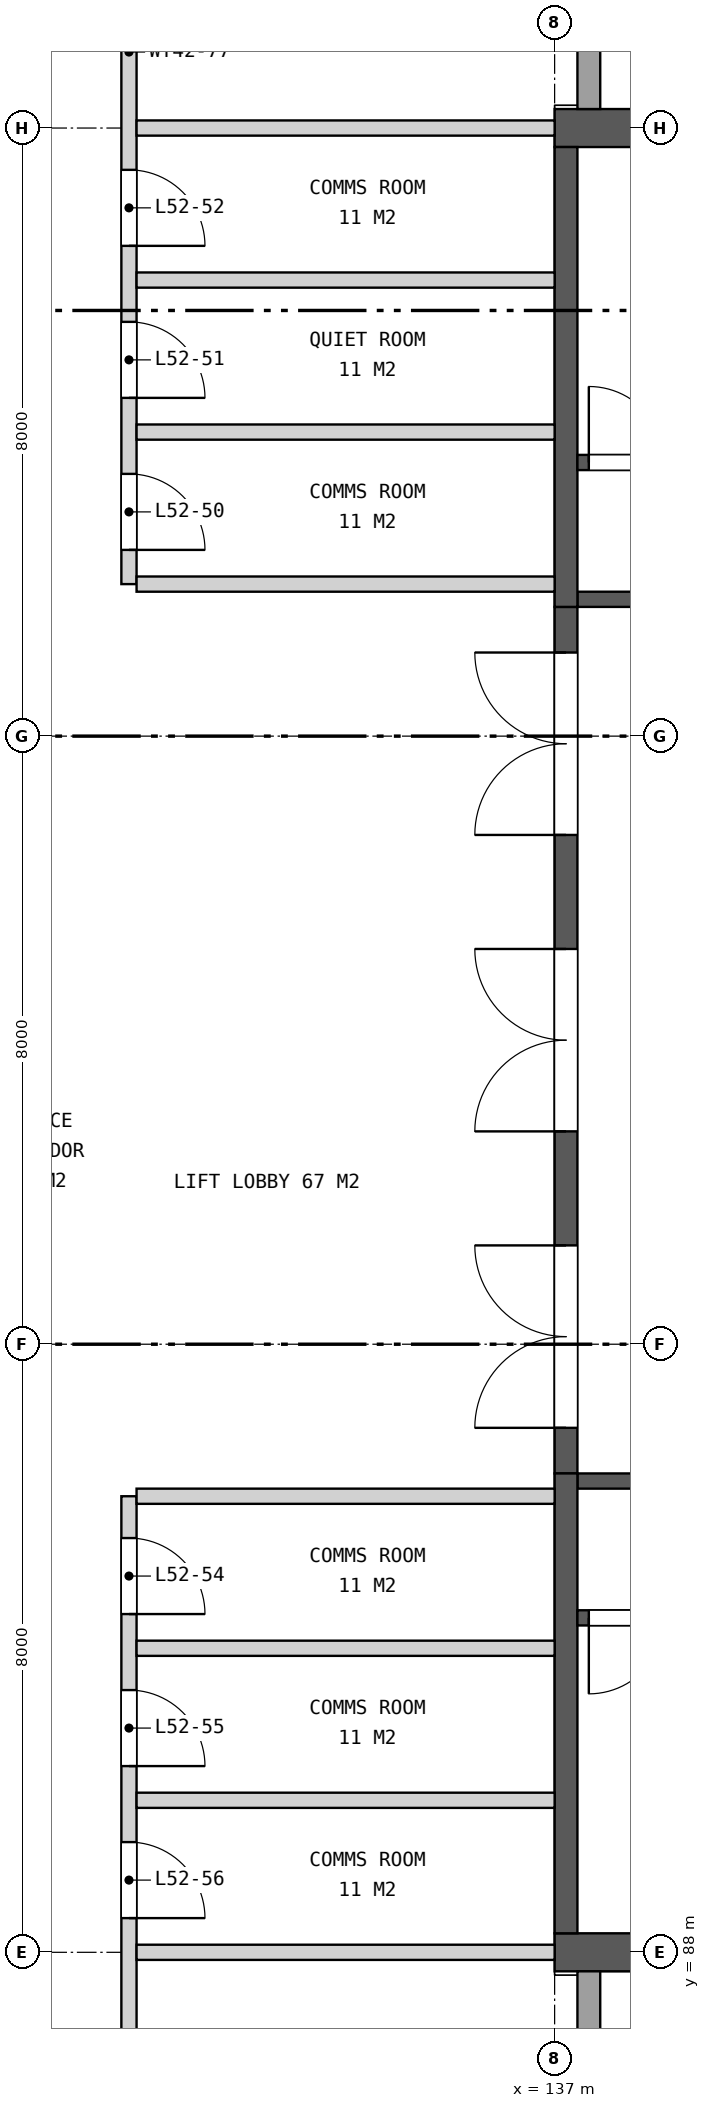
"""IFC4 building model, lengths in metres.
Left out: names, types, materials, properties, quantities, classifications, styles, units other than length and angle.
Written with IfcOpenShell. Run it as: python <this file> out.ifc"""

import sys

from ifc_helpers import new_model, si_unit, direction, frame, frame_2d, origin, place, context, subcontext, project, spatial, rectangle, extrude, element, fill, save


model = new_model("IFC4")
c1 = context("Model", 3, precision=1e-05, world=origin(), true_north=direction((0.0, 1.0)))
c2 = subcontext(c1, "Body", "Model", "MODEL_VIEW")
j1 = project(units=[si_unit("LENGTHUNIT", "METRE"), si_unit("PLANEANGLEUNIT", "RADIAN")], contexts=[c1])
p1 = place(None, origin())
s1 = spatial("IfcSite", under=j1, at=p1, CompositionType="ELEMENT")
p2 = place(p1, origin())
s2 = spatial("IfcBuilding", under=s1, at=p2, CompositionType="ELEMENT")
p3 = place(p2, frame((0.0, 0.0, 245.1)))
s3 = spatial("IfcBuildingStorey", under=s2, at=p3, CompositionType="ELEMENT", Elevation=245.1)
for number, where, z_axis, x_axis in (
    (1, (137.0, 112.0, 0.0), (0.0, 0.0, 1.0), (1.0, 0.0, 0.0)),
    (2, (137.0, 88.0, 0.0), (0.0, 0.0, 1.0), (1.0, 0.0, 0.0)),
):
    element("IfcWall", number, at=place(p3, frame(where, z_axis=z_axis, x_axis=x_axis)), inside=s3, PredefinedType="SHEAR", context=c2, shape_type="SweptSolid", body=[
        extrude(rectangle(XDim=7.1, YDim=0.5, at=frame_2d((3.55, 0.0))), origin(), (0.0, 0.0, 1.0), 4.2),
    ])
p4 = place(p3, frame((137.15, 94.3, 0.0), z_axis=(0.0, 0.0, 1.0), x_axis=(0.0, 1.0, 0.0)))
e3 = element("IfcWall", 3, at=p4, inside=s3, PredefinedType="SHEAR", context=c2, shape_type="SweptSolid", body=[
    extrude(rectangle(XDim=11.4, YDim=0.3, at=frame_2d((5.7, 0.0))), origin(), (0.0, 0.0, 1.0), 4.2),
])
p5 = place(p4, frame((0.6, 0.0, 0.0)))
e4 = element("IfcOpeningElement", 4, at=p5, cuts=e3, PredefinedType="OPENING", context=c2, shape_type="SweptSolid", body=[
    extrude(rectangle(XDim=2.4, YDim=2.4, at=frame_2d((1.2, 1.2))), frame((0.0, 0.16, 0.0), z_axis=(0.0, -1.0, 0.0), x_axis=(1.0, 0.0, 0.0)), (0.0, 0.0, 1.0), 0.32),
])
p6 = place(p4, frame((4.5, 0.0, 0.0)))
e5 = element("IfcOpeningElement", 5, at=p6, cuts=e3, PredefinedType="OPENING", context=c2, shape_type="SweptSolid", body=[
    extrude(rectangle(XDim=2.4, YDim=2.4, at=frame_2d((1.2, 1.2))), frame((0.0, 0.16, 0.0), z_axis=(0.0, -1.0, 0.0), x_axis=(1.0, 0.0, 0.0)), (0.0, 0.0, 1.0), 0.32),
])
p7 = place(p4, frame((8.4, 0.0, 0.0)))
e6 = element("IfcOpeningElement", 6, at=p7, cuts=e3, PredefinedType="OPENING", context=c2, shape_type="SweptSolid", body=[
    extrude(rectangle(XDim=2.4, YDim=2.4, at=frame_2d((1.2, 1.2))), frame((0.0, 0.16, 0.0), z_axis=(0.0, -1.0, 0.0), x_axis=(1.0, 0.0, 0.0)), (0.0, 0.0, 1.0), 0.32),
])
p8 = place(p3, frame((137.3, 105.8, 0.0), z_axis=(0.0, 0.0, 1.0), x_axis=(1.0, 0.0, 0.0)))
e7 = element("IfcWall", 7, at=p8, inside=s3, PredefinedType="SHEAR", context=c2, shape_type="SweptSolid", body=[
    extrude(rectangle(XDim=15.45, YDim=0.2, at=frame_2d((7.725, 0.0))), origin(), (0.0, 0.0, 1.0), 4.2),
])
p9 = place(p8, frame((0.95, 0.0, 0.0)))
e8 = element("IfcOpeningElement", 8, at=p9, cuts=e7, PredefinedType="OPENING", context=c2, shape_type="SweptSolid", body=[
    extrude(rectangle(XDim=1.1, YDim=2.1, at=frame_2d((0.55, 1.05))), frame((0.0, 0.11, 0.0), z_axis=(0.0, -1.0, 0.0), x_axis=(1.0, 0.0, 0.0)), (0.0, 0.0, 1.0), 0.22),
])
p10 = place(p3, frame((137.15, 105.7, 0.0), z_axis=(0.0, 0.0, 1.0), x_axis=(0.0, 1.0, 0.0)))
e9 = element("IfcWall", 9, at=p10, inside=s3, PredefinedType="SHEAR", context=c2, shape_type="SweptSolid", body=[
    extrude(rectangle(XDim=6.05, YDim=0.3, at=frame_2d((3.025, 0.0))), origin(), (0.0, 0.0, 1.0), 4.2),
])
p11 = place(p3, frame((137.3, 107.6, 0.0), z_axis=(0.0, 0.0, 1.0), x_axis=(1.0, 0.0, 0.0)))
e10 = element("IfcWall", 10, at=p11, inside=s3, PredefinedType="SHEAR", context=c2, shape_type="SweptSolid", body=[
    extrude(rectangle(XDim=6.8, YDim=0.2, at=frame_2d((3.4, 0.0))), origin(), (0.0, 0.0, 1.0), 4.2),
])
p12 = place(p11, frame((0.15, 0.0, 0.0)))
e11 = element("IfcOpeningElement", 11, at=p12, cuts=e10, PredefinedType="OPENING", context=c2, shape_type="SweptSolid", body=[
    extrude(rectangle(XDim=1.0, YDim=2.1, at=frame_2d((0.5, 1.05))), frame((0.0, 0.11, 0.0), z_axis=(0.0, -1.0, 0.0), x_axis=(1.0, 0.0, 0.0)), (0.0, 0.0, 1.0), 0.22),
])
p13 = place(p3, frame((137.3, 94.2, 0.0), z_axis=(0.0, 0.0, 1.0), x_axis=(1.0, 0.0, 0.0)))
e12 = element("IfcWall", 12, at=p13, inside=s3, PredefinedType="SHEAR", context=c2, shape_type="SweptSolid", body=[
    extrude(rectangle(XDim=15.45, YDim=0.2, at=frame_2d((7.725, 0.0))), origin(), (0.0, 0.0, 1.0), 4.2),
])
p14 = place(p13, frame((0.95, 0.0, 0.0)))
e13 = element("IfcOpeningElement", 13, at=p14, cuts=e12, PredefinedType="OPENING", context=c2, shape_type="SweptSolid", body=[
    extrude(rectangle(XDim=1.1, YDim=2.1, at=frame_2d((0.55, 1.05))), frame((0.0, 0.11, 0.0), z_axis=(0.0, -1.0, 0.0), x_axis=(1.0, 0.0, 0.0)), (0.0, 0.0, 1.0), 0.22),
])
p15 = place(p3, frame((137.15, 88.25, 0.0), z_axis=(0.0, 0.0, 1.0), x_axis=(0.0, 1.0, 0.0)))
e14 = element("IfcWall", 14, at=p15, inside=s3, PredefinedType="SHEAR", context=c2, shape_type="SweptSolid", body=[
    extrude(rectangle(XDim=6.05, YDim=0.3, at=frame_2d((3.025, 0.0))), origin(), (0.0, 0.0, 1.0), 4.2),
])
p16 = place(p3, frame((137.3, 92.4, 0.0), z_axis=(0.0, 0.0, 1.0), x_axis=(1.0, 0.0, 0.0)))
e15 = element("IfcWall", 15, at=p16, inside=s3, PredefinedType="SHEAR", context=c2, shape_type="SweptSolid", body=[
    extrude(rectangle(XDim=6.8, YDim=0.2, at=frame_2d((3.4, 0.0))), origin(), (0.0, 0.0, 1.0), 4.2),
])
p17 = place(p16, frame((0.15, 0.0, 0.0)))
e16 = element("IfcOpeningElement", 16, at=p17, cuts=e15, PredefinedType="OPENING", context=c2, shape_type="SweptSolid", body=[
    extrude(rectangle(XDim=1.0, YDim=2.1, at=frame_2d((0.5, 1.05))), frame((0.0, 0.11, 0.0), z_axis=(0.0, -1.0, 0.0), x_axis=(1.0, 0.0, 0.0)), (0.0, 0.0, 1.0), 0.22),
])
p18 = place(p3, frame((137.45, 112.25, 0.0), z_axis=(0.0, 0.0, 1.0), x_axis=(0.0, 1.0, 0.0)))
e17 = element("IfcWall", 17, at=p18, inside=s3, PredefinedType="SOLIDWALL", context=c2, shape_type="SweptSolid", body=[
    extrude(rectangle(XDim=7.715, YDim=0.3, at=frame_2d((3.857, 0.0))), origin(), (0.0, 0.0, 1.0), 3.9),
])
p19 = place(p18, frame((2.55, 0.0, 0.0)))
e18 = element("IfcOpeningElement", 18, at=p19, cuts=e17, PredefinedType="OPENING", context=c2, shape_type="SweptSolid", body=[
    extrude(rectangle(XDim=2.4, YDim=2.4, at=frame_2d((1.2, 1.2))), frame((0.0, 0.16, 0.0), z_axis=(0.0, -1.0, 0.0), x_axis=(1.0, 0.0, 0.0)), (0.0, 0.0, 1.0), 0.32),
])
p20 = place(p3, frame((137.45, 80.035, 0.0), z_axis=(0.0, 0.0, 1.0), x_axis=(0.0, 1.0, 0.0)))
e19 = element("IfcWall", 19, at=p20, inside=s3, PredefinedType="SOLIDWALL", context=c2, shape_type="SweptSolid", body=[
    extrude(rectangle(XDim=7.715, YDim=0.3, at=frame_2d((3.857, 0.0))), origin(), (0.0, 0.0, 1.0), 3.9),
])
p21 = place(p20, frame((2.765, 0.0, 0.0)))
e20 = element("IfcOpeningElement", 20, at=p21, cuts=e19, PredefinedType="OPENING", context=c2, shape_type="SweptSolid", body=[
    extrude(rectangle(XDim=2.4, YDim=2.4, at=frame_2d((1.2, 1.2))), frame((0.0, 0.16, 0.0), z_axis=(0.0, -1.0, 0.0), x_axis=(1.0, 0.0, 0.0)), (0.0, 0.0, 1.0), 0.32),
])
p22 = place(p3, frame((131.4, 80.0, 0.0), z_axis=(0.0, 0.0, 1.0), x_axis=(0.0, 1.0, 0.0)))
e21 = element("IfcWall", 21, at=p22, inside=s3, PredefinedType="SOLIDWALL", context=c2, shape_type="SweptSolid", body=[
    extrude(rectangle(XDim=14.0, YDim=0.2, at=frame_2d((7.0, 0.0))), origin(), (0.0, 0.0, 1.0), 3.443),
])
p23 = place(p22, frame((12.45, 0.0, 0.0)))
e22 = element("IfcOpeningElement", 22, at=p23, cuts=e21, PredefinedType="OPENING", context=c2, shape_type="SweptSolid", body=[
    extrude(rectangle(XDim=1.0, YDim=2.1, at=frame_2d((0.5, 1.05))), frame((0.0, 0.11, 0.0), z_axis=(0.0, -1.0, 0.0), x_axis=(1.0, 0.0, 0.0)), (0.0, 0.0, 1.0), 0.22),
])
p24 = place(p22, frame((10.45, 0.0, 0.0)))
e23 = element("IfcOpeningElement", 23, at=p24, cuts=e21, PredefinedType="OPENING", context=c2, shape_type="SweptSolid", body=[
    extrude(rectangle(XDim=1.0, YDim=2.1, at=frame_2d((0.5, 1.05))), frame((0.0, 0.11, 0.0), z_axis=(0.0, -1.0, 0.0), x_axis=(1.0, 0.0, 0.0)), (0.0, 0.0, 1.0), 0.22),
])
p25 = place(p22, frame((8.45, 0.0, 0.0)))
e24 = element("IfcOpeningElement", 24, at=p25, cuts=e21, PredefinedType="OPENING", context=c2, shape_type="SweptSolid", body=[
    extrude(rectangle(XDim=1.0, YDim=2.1, at=frame_2d((0.5, 1.05))), frame((0.0, 0.11, 0.0), z_axis=(0.0, -1.0, 0.0), x_axis=(1.0, 0.0, 0.0)), (0.0, 0.0, 1.0), 0.22),
])
p26 = place(p22, frame((3.45, 0.0, 0.0)))
e25 = element("IfcOpeningElement", 25, at=p26, cuts=e21, PredefinedType="OPENING", context=c2, shape_type="SweptSolid", body=[
    extrude(rectangle(XDim=1.0, YDim=2.1, at=frame_2d((0.5, 1.05))), frame((0.0, 0.11, 0.0), z_axis=(0.0, -1.0, 0.0), x_axis=(1.0, 0.0, 0.0)), (0.0, 0.0, 1.0), 0.22),
])
p27 = place(p3, frame((131.4, 106.0, 0.0), z_axis=(0.0, 0.0, 1.0), x_axis=(0.0, 1.0, 0.0)))
e26 = element("IfcWall", 26, at=p27, inside=s3, PredefinedType="SOLIDWALL", context=c2, shape_type="SweptSolid", body=[
    extrude(rectangle(XDim=14.0, YDim=0.2, at=frame_2d((7.0, 0.0))), origin(), (0.0, 0.0, 1.0), 3.443),
])
p28 = place(p27, frame((0.45, 0.0, 0.0)))
e27 = element("IfcOpeningElement", 27, at=p28, cuts=e26, PredefinedType="OPENING", context=c2, shape_type="SweptSolid", body=[
    extrude(rectangle(XDim=1.0, YDim=2.1, at=frame_2d((0.5, 1.05))), frame((0.0, 0.11, 0.0), z_axis=(0.0, -1.0, 0.0), x_axis=(1.0, 0.0, 0.0)), (0.0, 0.0, 1.0), 0.22),
])
p29 = place(p27, frame((2.45, 0.0, 0.0)))
e28 = element("IfcOpeningElement", 28, at=p29, cuts=e26, PredefinedType="OPENING", context=c2, shape_type="SweptSolid", body=[
    extrude(rectangle(XDim=1.0, YDim=2.1, at=frame_2d((0.5, 1.05))), frame((0.0, 0.11, 0.0), z_axis=(0.0, -1.0, 0.0), x_axis=(1.0, 0.0, 0.0)), (0.0, 0.0, 1.0), 0.22),
])
p30 = place(p27, frame((4.45, 0.0, 0.0)))
e29 = element("IfcOpeningElement", 29, at=p30, cuts=e26, PredefinedType="OPENING", context=c2, shape_type="SweptSolid", body=[
    extrude(rectangle(XDim=1.0, YDim=2.1, at=frame_2d((0.5, 1.05))), frame((0.0, 0.11, 0.0), z_axis=(0.0, -1.0, 0.0), x_axis=(1.0, 0.0, 0.0)), (0.0, 0.0, 1.0), 0.22),
])
p31 = place(p27, frame((9.45, 0.0, 0.0)))
e30 = element("IfcOpeningElement", 30, at=p31, cuts=e26, PredefinedType="OPENING", context=c2, shape_type="SweptSolid", body=[
    extrude(rectangle(XDim=1.0, YDim=2.1, at=frame_2d((0.5, 1.05))), frame((0.0, 0.11, 0.0), z_axis=(0.0, -1.0, 0.0), x_axis=(1.0, 0.0, 0.0)), (0.0, 0.0, 1.0), 0.22),
])
for number, where, z_axis, x_axis in (
    (31, (131.5, 88.0, 0.0), (0.0, 0.0, 1.0), (1.0, 0.0, 0.0)),
    (32, (131.5, 90.0, 0.0), (0.0, 0.0, 1.0), (1.0, 0.0, 0.0)),
    (33, (131.5, 92.0, 0.0), (0.0, 0.0, 1.0), (1.0, 0.0, 0.0)),
    (34, (131.5, 94.0, 0.0), (0.0, 0.0, 1.0), (1.0, 0.0, 0.0)),
    (35, (131.5, 106.0, 0.0), (0.0, 0.0, 1.0), (1.0, 0.0, 0.0)),
    (36, (131.5, 108.0, 0.0), (0.0, 0.0, 1.0), (1.0, 0.0, 0.0)),
    (37, (131.5, 110.0, 0.0), (0.0, 0.0, 1.0), (1.0, 0.0, 0.0)),
    (38, (131.5, 112.0, 0.0), (0.0, 0.0, 1.0), (1.0, 0.0, 0.0)),
):
    element("IfcWall", number, at=place(p3, frame(where, z_axis=z_axis, x_axis=x_axis)), inside=s3, PredefinedType="SOLIDWALL", context=c2, shape_type="SweptSolid", body=[
        extrude(rectangle(XDim=5.5, YDim=0.2, at=frame_2d((2.75, 0.0))), origin(), (0.0, 0.0, 1.0), 3.443),
    ])
p32 = place(p5, origin())
e39 = element("IfcDoor", 39, at=p32, inside=s3, OperationType="DOUBLE_DOOR_SINGLE_SWING", PredefinedType="DOOR", context=c2, shape_type="SweptSolid", body=[
    extrude(rectangle(XDim=2.4, YDim=2.4, at=frame_2d((1.2, 1.2))), frame((0.0, 0.025, 0.0), z_axis=(0.0, -1.0, 0.0), x_axis=(1.0, 0.0, 0.0)), (0.0, 0.0, 1.0), 0.05),
])
fill(e4, e39)
p33 = place(p6, origin())
e40 = element("IfcDoor", 40, at=p33, inside=s3, OperationType="DOUBLE_DOOR_SINGLE_SWING", PredefinedType="DOOR", context=c2, shape_type="SweptSolid", body=[
    extrude(rectangle(XDim=2.4, YDim=2.4, at=frame_2d((1.2, 1.2))), frame((0.0, 0.025, 0.0), z_axis=(0.0, -1.0, 0.0), x_axis=(1.0, 0.0, 0.0)), (0.0, 0.0, 1.0), 0.05),
])
fill(e5, e40)
p34 = place(p7, origin())
e41 = element("IfcDoor", 41, at=p34, inside=s3, OperationType="DOUBLE_DOOR_SINGLE_SWING", PredefinedType="DOOR", context=c2, shape_type="SweptSolid", body=[
    extrude(rectangle(XDim=2.4, YDim=2.4, at=frame_2d((1.2, 1.2))), frame((0.0, 0.025, 0.0), z_axis=(0.0, -1.0, 0.0), x_axis=(1.0, 0.0, 0.0)), (0.0, 0.0, 1.0), 0.05),
])
fill(e6, e41)
p35 = place(p12, origin())
e42 = element("IfcDoor", 42, at=p35, inside=s3, OperationType="SINGLE_SWING_LEFT", PredefinedType="DOOR", context=c2, shape_type="SweptSolid", body=[
    extrude(rectangle(XDim=1.0, YDim=2.1, at=frame_2d((0.5, 1.05))), frame((0.0, 0.025, 0.0), z_axis=(0.0, -1.0, 0.0), x_axis=(1.0, 0.0, 0.0)), (0.0, 0.0, 1.0), 0.05),
])
fill(e11, e42)
p36 = place(p17, frame((1.0, 0.0, 0.0), z_axis=(0.0, 0.0, 1.0), x_axis=(-1.0, 0.0, 0.0)))
e43 = element("IfcDoor", 43, at=p36, inside=s3, OperationType="SINGLE_SWING_RIGHT", PredefinedType="DOOR", context=c2, shape_type="SweptSolid", body=[
    extrude(rectangle(XDim=1.0, YDim=2.1, at=frame_2d((0.5, 1.05))), frame((0.0, 0.025, 0.0), z_axis=(0.0, -1.0, 0.0), x_axis=(1.0, 0.0, 0.0)), (0.0, 0.0, 1.0), 0.05),
])
fill(e16, e43)
p37 = place(p28, frame((1.0, 0.0, 0.0), z_axis=(0.0, 0.0, 1.0), x_axis=(-1.0, 0.0, 0.0)))
e44 = element("IfcDoor", 44, at=p37, inside=s3, OperationType="SINGLE_SWING_RIGHT", PredefinedType="DOOR", context=c2, shape_type="SweptSolid", body=[
    extrude(rectangle(XDim=1.0, YDim=2.1, at=frame_2d((0.5, 1.05))), frame((0.0, 0.025, 0.0), z_axis=(0.0, -1.0, 0.0), x_axis=(1.0, 0.0, 0.0)), (0.0, 0.0, 1.0), 0.05),
])
fill(e27, e44)
p38 = place(p29, frame((1.0, 0.0, 0.0), z_axis=(0.0, 0.0, 1.0), x_axis=(-1.0, 0.0, 0.0)))
e45 = element("IfcDoor", 45, at=p38, inside=s3, OperationType="SINGLE_SWING_RIGHT", PredefinedType="DOOR", context=c2, shape_type="SweptSolid", body=[
    extrude(rectangle(XDim=1.0, YDim=2.1, at=frame_2d((0.5, 1.05))), frame((0.0, 0.025, 0.0), z_axis=(0.0, -1.0, 0.0), x_axis=(1.0, 0.0, 0.0)), (0.0, 0.0, 1.0), 0.05),
])
fill(e28, e45)
p39 = place(p30, frame((1.0, 0.0, 0.0), z_axis=(0.0, 0.0, 1.0), x_axis=(-1.0, 0.0, 0.0)))
e46 = element("IfcDoor", 46, at=p39, inside=s3, OperationType="SINGLE_SWING_RIGHT", PredefinedType="DOOR", context=c2, shape_type="SweptSolid", body=[
    extrude(rectangle(XDim=1.0, YDim=2.1, at=frame_2d((0.5, 1.05))), frame((0.0, 0.025, 0.0), z_axis=(0.0, -1.0, 0.0), x_axis=(1.0, 0.0, 0.0)), (0.0, 0.0, 1.0), 0.05),
])
fill(e29, e46)
p40 = place(p23, frame((1.0, 0.0, 0.0), z_axis=(0.0, 0.0, 1.0), x_axis=(-1.0, 0.0, 0.0)))
e47 = element("IfcDoor", 47, at=p40, inside=s3, OperationType="SINGLE_SWING_RIGHT", PredefinedType="DOOR", context=c2, shape_type="SweptSolid", body=[
    extrude(rectangle(XDim=1.0, YDim=2.1, at=frame_2d((0.5, 1.05))), frame((0.0, 0.025, 0.0), z_axis=(0.0, -1.0, 0.0), x_axis=(1.0, 0.0, 0.0)), (0.0, 0.0, 1.0), 0.05),
])
fill(e22, e47)
p41 = place(p24, frame((1.0, 0.0, 0.0), z_axis=(0.0, 0.0, 1.0), x_axis=(-1.0, 0.0, 0.0)))
e48 = element("IfcDoor", 48, at=p41, inside=s3, OperationType="SINGLE_SWING_RIGHT", PredefinedType="DOOR", context=c2, shape_type="SweptSolid", body=[
    extrude(rectangle(XDim=1.0, YDim=2.1, at=frame_2d((0.5, 1.05))), frame((0.0, 0.025, 0.0), z_axis=(0.0, -1.0, 0.0), x_axis=(1.0, 0.0, 0.0)), (0.0, 0.0, 1.0), 0.05),
])
fill(e23, e48)
p42 = place(p25, frame((1.0, 0.0, 0.0), z_axis=(0.0, 0.0, 1.0), x_axis=(-1.0, 0.0, 0.0)))
e49 = element("IfcDoor", 49, at=p42, inside=s3, OperationType="SINGLE_SWING_RIGHT", PredefinedType="DOOR", context=c2, shape_type="SweptSolid", body=[
    extrude(rectangle(XDim=1.0, YDim=2.1, at=frame_2d((0.5, 1.05))), frame((0.0, 0.025, 0.0), z_axis=(0.0, -1.0, 0.0), x_axis=(1.0, 0.0, 0.0)), (0.0, 0.0, 1.0), 0.05),
])
fill(e24, e49)
save(model, sys.argv[1])
